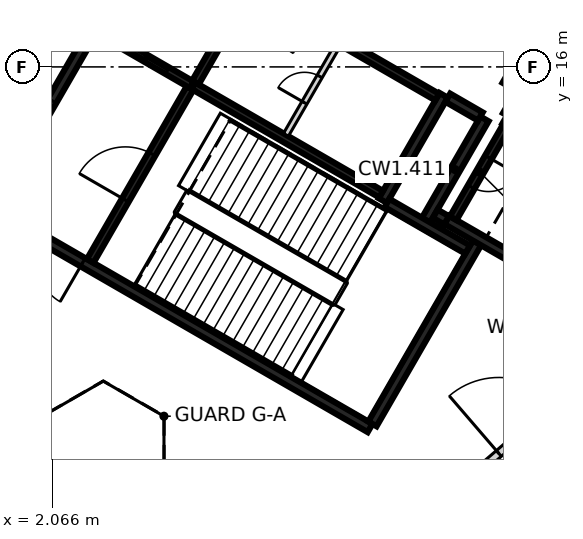
"""IFC4 building model, lengths in metres.
Left out: names, types, materials, properties, quantities, classifications, styles, units other than length and angle.
Written with IfcOpenShell. Run it as: python <this file> out.ifc"""

import sys

from ifc_helpers import new_model, si_unit, direction, frame, frame_2d, origin, place, context, subcontext, project, spatial, rectangle, extrude, element, fill, save


model = new_model("IFC4")
c1 = context("Model", 3, precision=1e-05, world=origin(), true_north=direction((0.0, 1.0)))
c2 = subcontext(c1, "Body", "Model", "MODEL_VIEW")
j1 = project(units=[si_unit("LENGTHUNIT", "METRE"), si_unit("PLANEANGLEUNIT", "RADIAN")], contexts=[c1])
p1 = place(None, origin())
s1 = spatial("IfcSite", under=j1, at=p1, CompositionType="ELEMENT")
p2 = place(p1, origin())
s2 = spatial("IfcBuilding", under=s1, at=p2, CompositionType="ELEMENT")
p3 = place(p2, frame((0.0, 0.0, 24.5)))
s3 = spatial("IfcBuildingStorey", under=s2, at=p3, CompositionType="ELEMENT", Elevation=24.5)
p4 = place(p3, frame((10.42, 6.498, 0.0), z_axis=(0.0, 0.0, 1.0), x_axis=(-0.866021906294, 0.500006057782, 0.0)))
e1 = element("IfcWall", 1, at=p4, inside=s3, PredefinedType="SHEAR", context=c2, shape_type="SweptSolid", body=[
    extrude(rectangle(XDim=11.55, YDim=0.25, at=frame_2d((5.775, 0.0))), origin(), (0.0, 0.0, 1.0), 4.6),
])
p5 = place(p4, frame((10.025, 0.0, 0.0)))
e2 = element("IfcOpeningElement", 2, at=p5, cuts=e1, PredefinedType="OPENING", context=c2, shape_type="SweptSolid", body=[
    extrude(rectangle(XDim=1.2, YDim=2.1, at=frame_2d((0.6, 1.05))), frame((0.0, 0.135, 0.0), z_axis=(0.0, -1.0, 0.0), x_axis=(1.0, 0.0, 0.0)), (0.0, 0.0, 1.0), 0.27),
])
p6 = place(p4, frame((8.725, 0.0, 0.0)))
e3 = element("IfcOpeningElement", 3, at=p6, cuts=e1, PredefinedType="OPENING", context=c2, shape_type="SweptSolid", body=[
    extrude(rectangle(XDim=1.2, YDim=2.1, at=frame_2d((0.6, 1.05))), frame((0.0, 0.135, 0.0), z_axis=(0.0, -1.0, 0.0), x_axis=(1.0, 0.0, 0.0)), (0.0, 0.0, 1.0), 0.27),
])
p7 = place(p3, frame((0.48, 12.381, 0.0), z_axis=(0.0, 0.0, 1.0), x_axis=(0.49999885962, 0.866026062182, 0.0)))
e4 = element("IfcWall", 4, at=p7, inside=s3, PredefinedType="SHEAR", context=c2, shape_type="SweptSolid", body=[
    extrude(rectangle(XDim=5.225, YDim=0.25, at=frame_2d((2.612, 0.0))), origin(), (0.0, 0.0, 1.0), 4.6),
])
p8 = place(p7, frame((1.95, 0.0, 0.0)))
e5 = element("IfcOpeningElement", 5, at=p8, cuts=e4, PredefinedType="OPENING", context=c2, shape_type="SweptSolid", body=[
    extrude(rectangle(XDim=1.2, YDim=2.1, at=frame_2d((0.6, 1.05))), frame((0.0, 0.135, 0.0), z_axis=(0.0, -1.0, 0.0), x_axis=(1.0, 0.0, 0.0)), (0.0, 0.0, 1.0), 0.27),
])
p9 = place(p3, frame((13.238, 11.378, 0.0), z_axis=(0.0, 0.0, 1.0), x_axis=(-0.500008851346, -0.866020293397, 0.0)))
e6 = element("IfcWall", 6, at=p9, inside=s3, PredefinedType="SHEAR", context=c2, shape_type="SweptSolid", body=[
    extrude(rectangle(XDim=5.51, YDim=0.25, at=frame_2d((2.755, 0.0))), origin(), (0.0, 0.0, 1.0), 4.6),
])
p10 = place(p3, frame((12.357, 15.252, 0.0), z_axis=(0.0, 0.0, 1.0), x_axis=(-0.500028443584, -0.866008981251, 0.0)))
e7 = element("IfcWall", 7, at=p10, inside=s3, PredefinedType="SHEAR", context=c2, shape_type="SweptSolid", body=[
    extrude(rectangle(XDim=3.2, YDim=0.25, at=frame_2d((1.6, 0.0))), origin(), (0.0, 0.0, 1.0), 4.6),
])
p11 = place(p3, frame((14.918, 10.54, 0.0), z_axis=(0.0, 0.0, 1.0), x_axis=(-0.866063538972, 0.499933942099, 0.0)))
e8 = element("IfcWall", 8, at=p11, inside=s3, PredefinedType="SHEAR", context=c2, shape_type="SweptSolid", body=[
    extrude(rectangle(XDim=2.865, YDim=0.25, at=frame_2d((1.432, 0.0))), origin(), (0.0, 0.0, 1.0), 4.6),
])
p12 = place(p3, frame((13.963, 14.614, 0.0), z_axis=(0.0, 0.0, 1.0), x_axis=(0.866042235819, -0.499970844928, 0.0)))
e9 = element("IfcWall", 9, at=p12, inside=s3, PredefinedType="SHEAR", context=c2, shape_type="SweptSolid", body=[
    extrude(rectangle(XDim=2.865, YDim=0.25, at=frame_2d((1.432, 0.0))), origin(), (0.0, 0.0, 1.0), 4.6),
])
p13 = place(p3, frame((11.888, 11.961, 0.0), z_axis=(0.0, 0.0, 1.0), x_axis=(0.500003324108, 0.866023484601, 0.0)))
e10 = element("IfcWall", 10, at=p13, inside=s3, PredefinedType="SHEAR", context=c2, shape_type="SweptSolid", body=[
    extrude(rectangle(XDim=3.085, YDim=0.25, at=frame_2d((1.542, 0.0))), origin(), (0.0, 0.0, 1.0), 4.6),
])
p14 = place(p3, frame((10.865, 12.418, 0.0), z_axis=(0.0, 0.0, 1.0), x_axis=(0.866026229868, -0.499998569178, 0.0)))
e11 = element("IfcWall", 11, at=p14, inside=s3, PredefinedType="SHEAR", context=c2, shape_type="SweptSolid", body=[
    extrude(rectangle(XDim=2.449, YDim=0.25, at=frame_2d((1.225, 0.0))), origin(), (0.0, 0.0, 1.0), 4.6),
])
p15 = place(p3, frame((14.945, 17.135, 0.0), z_axis=(0.0, 0.0, 1.0), x_axis=(-0.499983108224, -0.866035156036, 0.0)))
e12 = element("IfcWall", 12, at=p15, inside=s3, PredefinedType="SHEAR", context=c2, shape_type="SweptSolid", body=[
    extrude(rectangle(XDim=1.865, YDim=0.25, at=frame_2d((0.932, 0.0))), origin(), (0.0, 0.0, 1.0), 4.6),
])
p16 = place(p15, frame((0.535, 0.0, 0.0)))
e13 = element("IfcOpeningElement", 13, at=p16, cuts=e12, PredefinedType="OPENING", context=c2, shape_type="SweptSolid", body=[
    extrude(rectangle(XDim=1.25, YDim=2.1, at=frame_2d((0.625, 1.05))), frame((0.0, 0.135, 0.0), z_axis=(0.0, -1.0, 0.0), x_axis=(1.0, 0.0, 0.0)), (0.0, 0.0, 1.0), 0.27),
])
p17 = place(p3, frame((13.322, 14.695, 0.0), z_axis=(0.0, 0.0, 1.0), x_axis=(-0.866017078145, 0.500014420154, 0.0)))
e14 = element("IfcWall", 14, at=p17, inside=s3, PredefinedType="SHEAR", context=c2, shape_type="SweptSolid", body=[
    extrude(rectangle(XDim=0.989, YDim=0.25, at=frame_2d((0.495, 0.0))), origin(), (0.0, 0.0, 1.0), 4.6),
])
p18 = place(p3, frame((14.368, 15.315, 0.0), z_axis=(0.0, 0.0, 1.0), x_axis=(-0.499897359611, -0.866084655132, 0.0)))
e15 = element("IfcWall", 15, at=p18, inside=s3, PredefinedType="SHEAR", context=c2, shape_type="SweptSolid", body=[
    extrude(rectangle(XDim=0.685, YDim=0.25, at=frame_2d((0.342, 0.0))), origin(), (0.0, 0.0, 1.0), 4.6),
])
p19 = place(p3, frame((12.433, 11.964, 0.0), z_axis=(0.0, 0.0, 1.0), x_axis=(-0.866055875208, 0.499947218231, 0.0)))
e16 = element("IfcWall", 16, at=p19, inside=s3, PredefinedType="SHEAR", context=c2, shape_type="SweptSolid", body=[
    extrude(rectangle(XDim=0.345, YDim=0.25, at=frame_2d((0.172, 0.0))), origin(), (0.0, 0.0, 1.0), 4.6),
])
p20 = place(p3, frame((5.775, 15.502, 0.0), z_axis=(0.0, 0.0, 1.0), x_axis=(0.866020080793, -0.500009219579, 0.0)))
e17 = element("IfcWall", 17, at=p20, inside=s3, PredefinedType="SHEAR", context=c2, shape_type="SweptSolid", body=[
    extrude(rectangle(XDim=5.699, YDim=0.2, at=frame_2d((2.85, 0.0))), origin(), (0.0, 0.0, 1.0), 4.6),
])
p21 = place(p3, frame((12.185, 15.207, 0.0), z_axis=(0.0, 0.0, 1.0), x_axis=(-0.866020080793, 0.500009219579, 0.0)))
e18 = element("IfcWall", 18, at=p21, inside=s3, PredefinedType="SHEAR", context=c2, shape_type="SweptSolid", body=[
    extrude(rectangle(XDim=5.699, YDim=0.2, at=frame_2d((2.85, 0.0))), origin(), (0.0, 0.0, 1.0), 4.6),
])
p22 = place(p21, frame((3.874, 0.0, 0.0)))
e19 = element("IfcOpeningElement", 19, at=p22, cuts=e18, PredefinedType="OPENING", context=c2, shape_type="SweptSolid", body=[
    extrude(rectangle(XDim=0.9, YDim=2.1, at=frame_2d((0.45, 1.05))), frame((0.0, 0.11, 0.0), z_axis=(0.0, -1.0, 0.0), x_axis=(1.0, 0.0, 0.0)), (0.0, 0.0, 1.0), 0.22),
])
p23 = place(p3, frame((3.057, 10.895, 0.0), z_axis=(0.0, 0.0, 1.0), x_axis=(0.499989418164, 0.866031513124, 0.0)))
e20 = element("IfcWall", 20, at=p23, inside=s3, PredefinedType="SHEAR", context=c2, shape_type="SweptSolid", body=[
    extrude(rectangle(XDim=5.251, YDim=0.2, at=frame_2d((2.625, 0.0))), origin(), (0.0, 0.0, 1.0), 4.6),
])
p24 = place(p23, frame((1.849, 0.0, 0.0)))
e21 = element("IfcOpeningElement", 21, at=p24, cuts=e20, PredefinedType="OPENING", context=c2, shape_type="SweptSolid", body=[
    extrude(rectangle(XDim=1.4, YDim=2.1, at=frame_2d((0.7, 1.05))), frame((0.0, 0.11, 0.0), z_axis=(0.0, -1.0, 0.0), x_axis=(1.0, 0.0, 0.0)), (0.0, 0.0, 1.0), 0.22),
])
p25 = place(p3, frame((14.008, 14.442, 0.0), z_axis=(0.0, 0.0, 1.0), x_axis=(-0.499986818241, -0.866033014143, 0.0)))
e22 = element("IfcWall", 22, at=p25, inside=s3, PredefinedType="SHEAR", context=c2, shape_type="SweptSolid", body=[
    extrude(rectangle(XDim=2.798, YDim=0.2, at=frame_2d((1.399, 0.0))), origin(), (0.0, 0.0, 1.0), 4.6),
])
p26 = place(p25, frame((0.949, 0.0, 0.0)))
e23 = element("IfcOpeningElement", 23, at=p26, cuts=e22, PredefinedType="OPENING", context=c2, shape_type="SweptSolid", body=[
    extrude(rectangle(XDim=0.9, YDim=2.1, at=frame_2d((0.45, 1.05))), frame((0.0, 0.11, 0.0), z_axis=(0.0, -1.0, 0.0), x_axis=(1.0, 0.0, 0.0)), (0.0, 0.0, 1.0), 0.22),
])
p27 = place(p3, frame((7.199, 17.97, 0.0), z_axis=(0.0, 0.0, 1.0), x_axis=(-0.499968400327, -0.866043647095, 0.0)))
e24 = element("IfcWall", 24, at=p27, inside=s3, PredefinedType="SHEAR", context=c2, shape_type="SweptSolid", body=[
    extrude(rectangle(XDim=2.75, YDim=0.2, at=frame_2d((1.375, 0.0))), origin(), (0.0, 0.0, 1.0), 4.6),
])
p28 = place(p3, frame((5.725, 15.531, 0.0), z_axis=(0.0, 0.0, 1.0), x_axis=(-0.866037306777, 0.499979382845, 0.0)))
e25 = element("IfcWall", 25, at=p28, inside=s3, PredefinedType="SHEAR", context=c2, shape_type="SweptSolid", body=[
    extrude(rectangle(XDim=2.742, YDim=0.2, at=frame_2d((1.371, 0.0))), origin(), (0.0, 0.0, 1.0), 4.6),
])
p29 = place(p28, frame((0.743, 0.0, 0.0)))
e26 = element("IfcOpeningElement", 26, at=p29, cuts=e25, PredefinedType="OPENING", context=c2, shape_type="SweptSolid", body=[
    extrude(rectangle(XDim=1.3, YDim=2.1, at=frame_2d((0.65, 1.05))), frame((0.0, 0.11, 0.0), z_axis=(0.0, -1.0, 0.0), x_axis=(1.0, 0.0, 0.0)), (0.0, 0.0, 1.0), 0.22),
])
p30 = place(p3, frame((8.207, 14.214, 0.0), z_axis=(0.0, 0.0, 1.0), x_axis=(0.499922376475, 0.866070215109, 0.0)))
e27 = element("IfcWall", 27, at=p30, inside=s3, PredefinedType="PARTITIONING", context=c2, shape_type="SweptSolid", body=[
    extrude(rectangle(XDim=2.749, YDim=0.15, at=frame_2d((1.374, 0.0))), origin(), (0.0, 0.0, 1.0), 4.6),
])
p31 = place(p30, frame((0.974, 0.0, 0.0)))
e28 = element("IfcOpeningElement", 28, at=p31, cuts=e27, PredefinedType="OPENING", context=c2, shape_type="SweptSolid", body=[
    extrude(rectangle(XDim=0.8, YDim=2.1, at=frame_2d((0.4, 1.05))), frame((0.0, 0.085, 0.0), z_axis=(0.0, -1.0, 0.0), x_axis=(1.0, 0.0, 0.0)), (0.0, 0.0, 1.0), 0.17),
])
p32 = place(p3, frame((12.187, 4.433, 0.0), z_axis=(0.0, 0.0, 1.0), x_axis=(0.757934867899, 0.652330235405, 0.0)))
e29 = element("IfcWall", 29, at=p32, inside=s3, PredefinedType="PARTITIONING", context=c2, shape_type="SweptSolid", body=[
    extrude(rectangle(XDim=6.279, YDim=0.2, at=frame_2d((3.14, 0.0))), origin(), (0.0, 0.0, 1.0), 4.6),
])
p33 = place(p32, frame((2.139, 0.0, 0.0)))
e30 = element("IfcOpeningElement", 30, at=p33, cuts=e29, PredefinedType="OPENING", context=c2, shape_type="SweptSolid", body=[
    extrude(rectangle(XDim=2.0, YDim=2.1, at=frame_2d((1.0, 1.05))), frame((0.0, 0.11, 0.0), z_axis=(0.0, -1.0, 0.0), x_axis=(1.0, 0.0, 0.0)), (0.0, 0.0, 1.0), 0.22),
])
p34 = place(p29, origin())
e31 = element("IfcDoor", 31, at=p34, inside=s3, OperationType="SLIDING_TO_LEFT", PredefinedType="DOOR", context=c2, shape_type="SweptSolid", body=[
    extrude(rectangle(XDim=1.3, YDim=2.1, at=frame_2d((0.65, 1.05))), frame((0.0, 0.025, 0.0), z_axis=(0.0, -1.0, 0.0), x_axis=(1.0, 0.0, 0.0)), (0.0, 0.0, 1.0), 0.05),
])
fill(e26, e31)
p35 = place(p6, origin())
e32 = element("IfcDoor", 32, at=p35, inside=s3, OperationType="SINGLE_SWING_RIGHT", PredefinedType="DOOR", context=c2, shape_type="SweptSolid", body=[
    extrude(rectangle(XDim=1.2, YDim=2.1, at=frame_2d((0.6, 1.05))), frame((0.0, 0.025, 0.0), z_axis=(0.0, -1.0, 0.0), x_axis=(1.0, 0.0, 0.0)), (0.0, 0.0, 1.0), 0.05),
])
fill(e3, e32)
p36 = place(p24, origin())
e33 = element("IfcDoor", 33, at=p36, inside=s3, OperationType="SINGLE_SWING_LEFT", PredefinedType="DOOR", context=c2, shape_type="SweptSolid", body=[
    extrude(rectangle(XDim=1.4, YDim=2.1, at=frame_2d((0.7, 1.05))), frame((0.0, 0.025, 0.0), z_axis=(0.0, -1.0, 0.0), x_axis=(1.0, 0.0, 0.0)), (0.0, 0.0, 1.0), 0.05),
])
fill(e21, e33)
p37 = place(p26, origin())
e34 = element("IfcDoor", 34, at=p37, inside=s3, OperationType="SINGLE_SWING_LEFT", PredefinedType="DOOR", context=c2, shape_type="SweptSolid", body=[
    extrude(rectangle(XDim=0.9, YDim=2.1, at=frame_2d((0.45, 1.05))), frame((0.0, 0.025, 0.0), z_axis=(0.0, -1.0, 0.0), x_axis=(1.0, 0.0, 0.0)), (0.0, 0.0, 1.0), 0.05),
])
fill(e23, e34)
p38 = place(p31, origin())
e35 = element("IfcDoor", 35, at=p38, inside=s3, OperationType="SINGLE_SWING_RIGHT", PredefinedType="DOOR", context=c2, shape_type="SweptSolid", body=[
    extrude(rectangle(XDim=0.8, YDim=2.1, at=frame_2d((0.4, 1.05))), frame((0.0, 0.025, 0.0), z_axis=(0.0, -1.0, 0.0), x_axis=(1.0, 0.0, 0.0)), (0.0, 0.0, 1.0), 0.05),
])
fill(e28, e35)
p39 = place(p8, origin())
e36 = element("IfcDoor", 36, at=p39, inside=s3, OperationType="SINGLE_SWING_RIGHT", PredefinedType="DOOR", context=c2, shape_type="SweptSolid", body=[
    extrude(rectangle(XDim=1.2, YDim=2.1, at=frame_2d((0.6, 1.05))), frame((0.0, 0.025, 0.0), z_axis=(0.0, -1.0, 0.0), x_axis=(1.0, 0.0, 0.0)), (0.0, 0.0, 1.0), 0.05),
])
fill(e5, e36)
p40 = place(p33, frame((2.0, 0.0, 0.0), z_axis=(0.0, 0.0, 1.0), x_axis=(-1.0, 0.0, 0.0)))
e37 = element("IfcDoor", 37, at=p40, inside=s3, OperationType="DOUBLE_DOOR_SINGLE_SWING", PredefinedType="DOOR", context=c2, shape_type="SweptSolid", body=[
    extrude(rectangle(XDim=2.0, YDim=2.1, at=frame_2d((1.0, 1.05))), frame((0.0, 0.025, 0.0), z_axis=(0.0, -1.0, 0.0), x_axis=(1.0, 0.0, 0.0)), (0.0, 0.0, 1.0), 0.05),
])
fill(e30, e37)
save(model, sys.argv[1])
